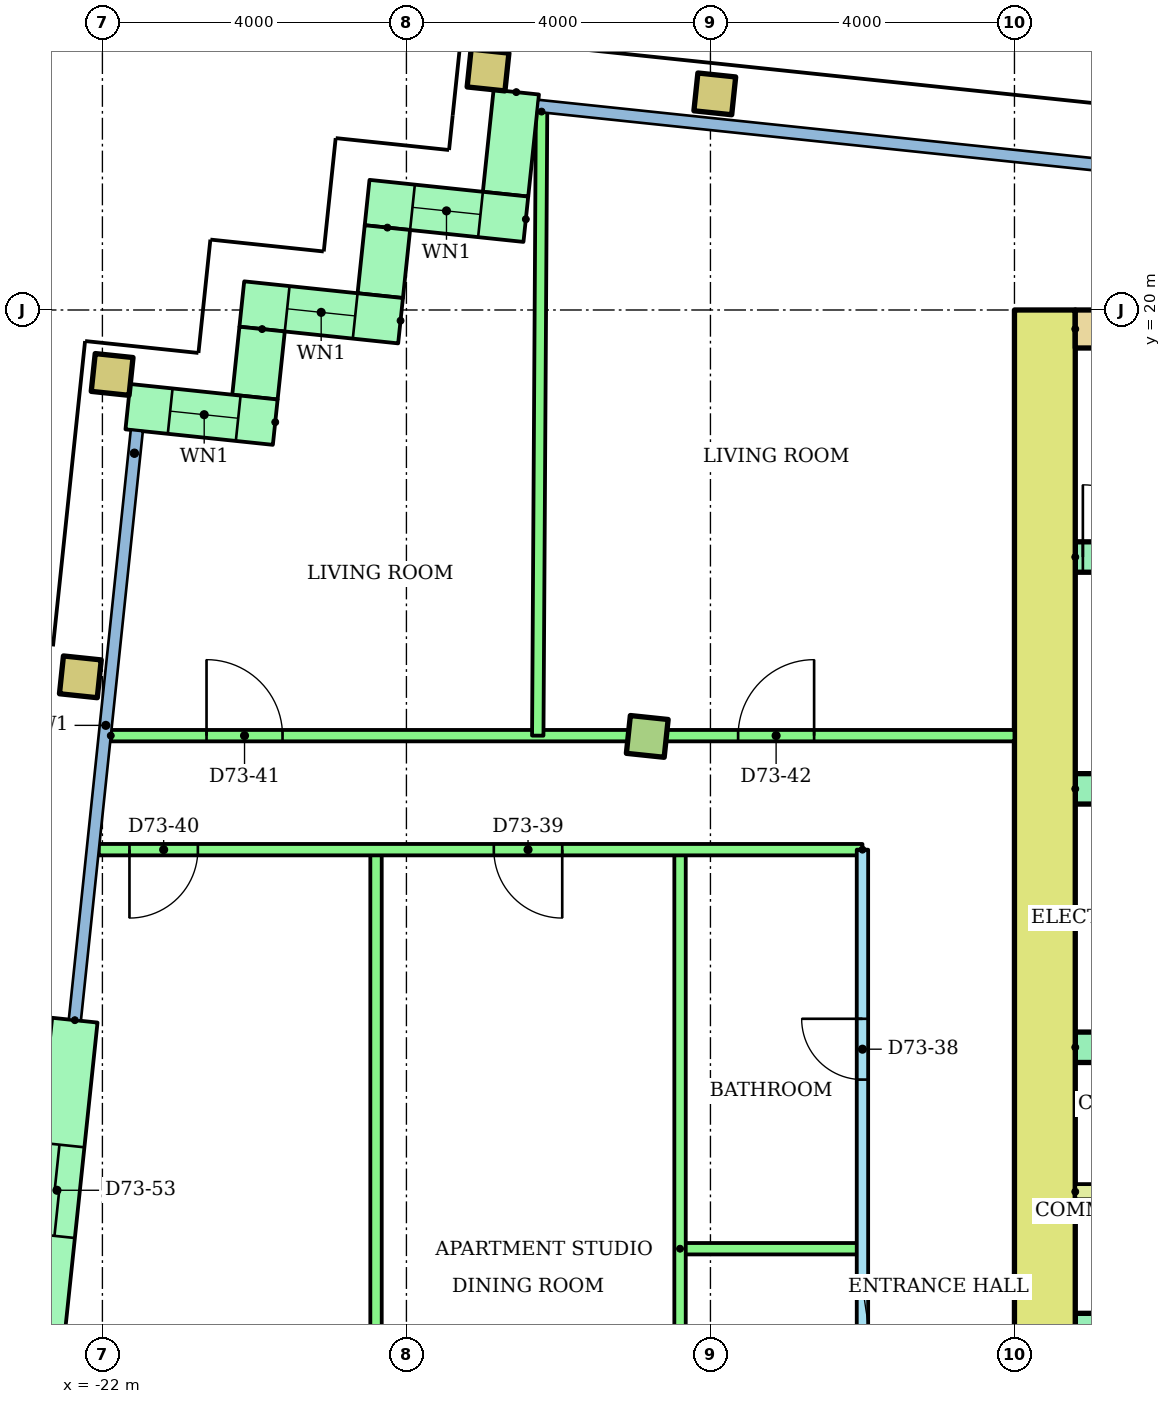
"""IFC4 building model, lengths in metres.
Left out: names, types, materials, properties, quantities, classifications, styles, units other than length and angle.
Written with IfcOpenShell. Run it as: python <this file> out.ifc"""

import sys

from ifc_helpers import new_model, si_unit, direction, frame, frame_2d, origin, origin_2d, place, context, subcontext, project, spatial, rectangle, hollow_rectangle, extrude, element, fill, save


model = new_model("IFC4")
c1 = context("Model", 3, precision=1e-05, world=origin(), true_north=direction((0.0, 1.0)))
c2 = subcontext(c1, "Body", "Model", "MODEL_VIEW")
j1 = project(units=[si_unit("LENGTHUNIT", "METRE"), si_unit("PLANEANGLEUNIT", "RADIAN")], contexts=[c1])
p1 = place(None, origin())
s1 = spatial("IfcSite", under=j1, at=p1, CompositionType="ELEMENT")
p2 = place(p1, origin())
s2 = spatial("IfcBuilding", under=s1, at=p2, CompositionType="ELEMENT")
p3 = place(p2, frame((0.0, 0.0, 278.7)))
s3 = spatial("IfcBuildingStorey", under=s2, at=p3, CompositionType="ELEMENT", Elevation=278.7)
p4 = place(p3, frame((-22.29, 15.174, 0.0), z_axis=(0.0, 0.0, 1.0), x_axis=(0.994521895368, -0.104528463268, 0.0)))
e1 = element("IfcColumn", 1, at=p4, inside=s3, PredefinedType="COLUMN", context=c2, shape_type="SweptSolid", body=[
    extrude(hollow_rectangle(XDim=0.5, YDim=0.5, WallThickness=0.025, at=origin_2d()), origin(), (0.0, 0.0, 1.0), 3.2),
])
p5 = place(p3, frame((-14.831, 14.39, 0.0), z_axis=(0.0, 0.0, 1.0), x_axis=(0.994521895368, -0.104528463268, 0.0)))
e2 = element("IfcColumn", 2, at=p5, inside=s3, PredefinedType="COLUMN", context=c2, shape_type="SweptSolid", body=[
    extrude(rectangle(XDim=0.5, YDim=0.5, at=origin_2d()), origin(), (0.0, 0.0, 1.0), 3.2),
])
for number, where, z_axis, x_axis in (
    (3, (-21.872, 19.152, 0.0), (0.0, 0.0, 1.0), (0.995, -0.105, 0.0)),
    (4, (-16.926, 23.157, 0.0), (0.0, 0.0, 1.0), (0.995, -0.105, 0.0)),
    (5, (-13.943, 22.843, 0.0), (0.0, 0.0, 1.0), (0.995, -0.105, 0.0)),
):
    element("IfcColumn", number, at=place(p3, frame(where, z_axis=z_axis, x_axis=x_axis)), inside=s3, PredefinedType="COLUMN", context=c2, shape_type="SweptSolid", body=[
        extrude(hollow_rectangle(XDim=0.5, YDim=0.5, WallThickness=0.025, at=origin_2d()), origin(), (0.0, 0.0, 1.0), 3.2),
    ])
p6 = place(p3, frame((-16.555, 22.866, 0.0), z_axis=(0.0, 0.0, 1.0), x_axis=(-0.104515354875, -0.994523273029, 0.0)))
e6 = element("IfcWall", 6, at=p6, inside=s3, PredefinedType="STANDARD", context=c2, shape_type="SweptSolid", body=[
    extrude(rectangle(XDim=1.35, YDim=0.6, at=frame_2d((0.675, 0.0))), origin(), (0.0, 0.0, 1.0), 2.8),
])
p7 = place(p3, frame((-16.429, 21.194, 0.0), z_axis=(0.0, 0.0, 1.0), x_axis=(-0.994522640205, 0.104521376379, 0.0)))
e7 = element("IfcWall", 7, at=p7, inside=s3, PredefinedType="STANDARD", context=c2, shape_type="SweptSolid", body=[
    extrude(rectangle(XDim=2.1, YDim=0.6, at=frame_2d((1.05, 0.0))), origin(), (0.0, 0.0, 1.0), 2.8),
])
p8 = place(p7, frame((0.6, 0.0, 0.9)))
e8 = element("IfcOpeningElement", 8, at=p8, cuts=e7, PredefinedType="OPENING", context=c2, shape_type="SweptSolid", body=[
    extrude(rectangle(XDim=0.9, YDim=1.5, at=frame_2d((0.45, 0.75))), frame((0.0, 0.31, 0.0), z_axis=(0.0, -1.0, 0.0), x_axis=(1.0, 0.0, 0.0)), (0.0, 0.0, 1.0), 0.62),
])
p9 = place(p3, frame((-18.25, 21.084, 0.0), z_axis=(0.0, 0.0, 1.0), x_axis=(-0.104416541099, -0.994533652495, 0.0)))
e9 = element("IfcWall", 9, at=p9, inside=s3, PredefinedType="STANDARD", context=c2, shape_type="SweptSolid", body=[
    extrude(rectangle(XDim=0.9, YDim=0.6, at=frame_2d((0.45, 0.0))), origin(), (0.0, 0.0, 1.0), 2.8),
])
p10 = place(p3, frame((-18.077, 19.859, 0.0), z_axis=(0.0, 0.0, 1.0), x_axis=(-0.994522640205, 0.104521376379, 0.0)))
e10 = element("IfcWall", 10, at=p10, inside=s3, PredefinedType="STANDARD", context=c2, shape_type="SweptSolid", body=[
    extrude(rectangle(XDim=2.1, YDim=0.6, at=frame_2d((1.05, 0.0))), origin(), (0.0, 0.0, 1.0), 2.8),
])
p11 = place(p10, frame((0.6, 0.0, 0.9)))
e11 = element("IfcOpeningElement", 11, at=p11, cuts=e10, PredefinedType="OPENING", context=c2, shape_type="SweptSolid", body=[
    extrude(rectangle(XDim=0.9, YDim=1.5, at=frame_2d((0.45, 0.75))), frame((0.0, 0.31, 0.0), z_axis=(0.0, -1.0, 0.0), x_axis=(1.0, 0.0, 0.0)), (0.0, 0.0, 1.0), 0.62),
])
p12 = place(p3, frame((-19.899, 19.749, 0.0), z_axis=(0.0, 0.0, 1.0), x_axis=(-0.104741284723, -0.994499503909, 0.0)))
e12 = element("IfcWall", 12, at=p12, inside=s3, PredefinedType="STANDARD", context=c2, shape_type="SweptSolid", body=[
    extrude(rectangle(XDim=0.9, YDim=0.6, at=frame_2d((0.45, 0.0))), origin(), (0.0, 0.0, 1.0), 2.8),
])
p13 = place(p3, frame((-19.726, 18.524, 0.0), z_axis=(0.0, 0.0, 1.0), x_axis=(-0.994534226826, 0.104411070641, 0.0)))
e13 = element("IfcWall", 13, at=p13, inside=s3, PredefinedType="STANDARD", context=c2, shape_type="SweptSolid", body=[
    extrude(rectangle(XDim=1.95, YDim=0.6, at=frame_2d((0.975, 0.0))), origin(), (0.0, 0.0, 1.0), 2.8),
])
p14 = place(p13, frame((0.49, 0.0, 0.9)))
e14 = element("IfcOpeningElement", 14, at=p14, cuts=e13, PredefinedType="OPENING", context=c2, shape_type="SweptSolid", body=[
    extrude(rectangle(XDim=0.9, YDim=1.5, at=frame_2d((0.45, 0.75))), frame((0.0, 0.31, 0.0), z_axis=(0.0, -1.0, 0.0), x_axis=(1.0, 0.0, 0.0)), (0.0, 0.0, 1.0), 0.62),
])
p15 = place(p3, frame((-22.363, 10.657, 0.0), z_axis=(0.0, 0.0, 1.0), x_axis=(-0.104492739125, -0.994525649478, 0.0)))
e15 = element("IfcWall", 15, at=p15, inside=s3, PredefinedType="STANDARD", context=c2, shape_type="SweptSolid", body=[
    extrude(rectangle(XDim=4.5, YDim=0.6, at=frame_2d((2.25, 0.0))), origin(), (0.0, 0.0, 1.0), 2.8),
])
p16 = place(p15, frame((1.65, 0.0, 0.0)))
e16 = element("IfcOpeningElement", 16, at=p16, cuts=e15, PredefinedType="OPENING", context=c2, shape_type="SweptSolid", body=[
    extrude(rectangle(XDim=1.2, YDim=2.1, at=frame_2d((0.6, 1.05))), frame((0.0, 0.31, 0.0), z_axis=(0.0, -1.0, 0.0), x_axis=(1.0, 0.0, 0.0)), (0.0, 0.0, 1.0), 0.62),
])
p17 = place(p3, frame((-9.6, 6.4, 0.0), z_axis=(0.0, 0.0, 1.0), x_axis=(0.0, 1.0, 0.0)))
e17 = element("IfcWall", 17, at=p17, inside=s3, PredefinedType="SHEAR", context=c2, shape_type="SweptSolid", body=[
    extrude(rectangle(XDim=13.6, YDim=0.8, at=frame_2d((6.8, 0.0))), origin(), (0.0, 0.0, 1.0), 2.8),
])
p18 = place(p3, frame((-9.2, 19.75, 0.0)))
e18 = element("IfcWall", 18, at=p18, inside=s3, PredefinedType="SHEAR", context=c2, shape_type="SweptSolid", body=[
    extrude(rectangle(XDim=18.4, YDim=0.5, at=frame_2d((9.2, 0.0))), origin(), (0.0, 0.0, 1.0), 2.8),
])
p19 = place(p3, frame((-9.2, 6.6, 0.0)))
e19 = element("IfcWall", 19, at=p19, inside=s3, PredefinedType="SHEAR", context=c2, shape_type="SweptSolid", body=[
    extrude(rectangle(XDim=18.4, YDim=0.4, at=frame_2d((9.2, 0.0))), origin(), (0.0, 0.0, 1.0), 2.8),
])
p20 = place(p19, frame((8.3, 0.0, 0.0)))
e20 = element("IfcOpeningElement", 20, at=p20, cuts=e19, PredefinedType="OPENING", context=c2, shape_type="SweptSolid", body=[
    extrude(rectangle(XDim=1.8, YDim=2.1, at=frame_2d((0.9, 1.05))), frame((0.0, 0.21, 0.0), z_axis=(0.0, -1.0, 0.0), x_axis=(1.0, 0.0, 0.0)), (0.0, 0.0, 1.0), 0.42),
])
p21 = place(p19, frame((3.8, 0.0, 0.0)))
e21 = element("IfcOpeningElement", 21, at=p21, cuts=e19, PredefinedType="OPENING", context=c2, shape_type="SweptSolid", body=[
    extrude(rectangle(XDim=1.8, YDim=2.1, at=frame_2d((0.9, 1.05))), frame((0.0, 0.21, 0.0), z_axis=(0.0, -1.0, 0.0), x_axis=(1.0, 0.0, 0.0)), (0.0, 0.0, 1.0), 0.42),
])
p22 = place(p19, frame((12.8, 0.0, 0.0)))
e22 = element("IfcOpeningElement", 22, at=p22, cuts=e19, PredefinedType="OPENING", context=c2, shape_type="SweptSolid", body=[
    extrude(rectangle(XDim=1.8, YDim=2.1, at=frame_2d((0.9, 1.05))), frame((0.0, 0.21, 0.0), z_axis=(0.0, -1.0, 0.0), x_axis=(1.0, 0.0, 0.0)), (0.0, 0.0, 1.0), 0.42),
])
p23 = place(p3, frame((-9.2, 10.3, 0.0)))
e23 = element("IfcWall", 23, at=p23, inside=s3, PredefinedType="SHEAR", context=c2, shape_type="SweptSolid", body=[
    extrude(rectangle(XDim=8.0, YDim=0.4, at=frame_2d((4.0, 0.0))), origin(), (0.0, 0.0, 1.0), 2.8),
])
p24 = place(p23, frame((3.35, 0.0, 0.0)))
e24 = element("IfcOpeningElement", 24, at=p24, cuts=e23, PredefinedType="OPENING", context=c2, shape_type="SweptSolid", body=[
    extrude(rectangle(XDim=1.1, YDim=2.1, at=frame_2d((0.55, 1.05))), frame((0.0, 0.21, 0.0), z_axis=(0.0, -1.0, 0.0), x_axis=(1.0, 0.0, 0.0)), (0.0, 0.0, 1.0), 0.42),
])
p25 = place(p23, frame((6.083, 0.0, 0.0)))
e25 = element("IfcOpeningElement", 25, at=p25, cuts=e23, PredefinedType="OPENING", context=c2, shape_type="SweptSolid", body=[
    extrude(rectangle(XDim=1.1, YDim=2.1, at=frame_2d((0.55, 1.05))), frame((0.0, 0.21, 0.0), z_axis=(0.0, -1.0, 0.0), x_axis=(1.0, 0.0, 0.0)), (0.0, 0.0, 1.0), 0.42),
])
p26 = place(p23, frame((0.917, 0.0, 0.0)))
e26 = element("IfcOpeningElement", 26, at=p26, cuts=e23, PredefinedType="OPENING", context=c2, shape_type="SweptSolid", body=[
    extrude(rectangle(XDim=1.0, YDim=2.1, at=frame_2d((0.5, 1.05))), frame((0.0, 0.21, 0.0), z_axis=(0.0, -1.0, 0.0), x_axis=(1.0, 0.0, 0.0)), (0.0, 0.0, 1.0), 0.42),
])
p27 = place(p3, frame((-9.2, 13.7, 0.0)))
e27 = element("IfcWall", 27, at=p27, inside=s3, PredefinedType="SHEAR", context=c2, shape_type="SweptSolid", body=[
    extrude(rectangle(XDim=8.0, YDim=0.4, at=frame_2d((4.0, 0.0))), origin(), (0.0, 0.0, 1.0), 2.8),
])
p28 = place(p3, frame((-9.2, 16.75, 0.0)))
e28 = element("IfcWall", 28, at=p28, inside=s3, PredefinedType="SHEAR", context=c2, shape_type="SweptSolid", body=[
    extrude(rectangle(XDim=18.4, YDim=0.4, at=frame_2d((9.2, 0.0))), origin(), (0.0, 0.0, 1.0), 2.8),
])
p29 = place(p28, frame((0.1, 0.0, 0.0)))
e29 = element("IfcOpeningElement", 29, at=p29, cuts=e28, PredefinedType="OPENING", context=c2, shape_type="SweptSolid", body=[
    extrude(rectangle(XDim=0.95, YDim=2.1, at=frame_2d((0.475, 1.05))), frame((0.0, 0.21, 0.0), z_axis=(0.0, -1.0, 0.0), x_axis=(1.0, 0.0, 0.0)), (0.0, 0.0, 1.0), 0.42),
])
p30 = place(p28, frame((6.1, 0.0, 0.0)))
e30 = element("IfcOpeningElement", 30, at=p30, cuts=e28, PredefinedType="OPENING", context=c2, shape_type="SweptSolid", body=[
    extrude(rectangle(XDim=0.95, YDim=2.1, at=frame_2d((0.475, 1.05))), frame((0.0, 0.21, 0.0), z_axis=(0.0, -1.0, 0.0), x_axis=(1.0, 0.0, 0.0)), (0.0, 0.0, 1.0), 0.42),
])
p31 = place(p28, frame((12.1, 0.0, 0.0)))
e31 = element("IfcOpeningElement", 31, at=p31, cuts=e28, PredefinedType="OPENING", context=c2, shape_type="SweptSolid", body=[
    extrude(rectangle(XDim=0.95, YDim=2.1, at=frame_2d((0.475, 1.05))), frame((0.0, 0.21, 0.0), z_axis=(0.0, -1.0, 0.0), x_axis=(1.0, 0.0, 0.0)), (0.0, 0.0, 1.0), 0.42),
])
p32 = place(p3, frame((-9.2, 8.4, 0.0)))
e32 = element("IfcWall", 32, at=p32, inside=s3, PredefinedType="PARTITIONING", context=c2, shape_type="SweptSolid", body=[
    extrude(rectangle(XDim=3.4, YDim=0.2, at=frame_2d((1.7, 0.0))), origin(), (0.0, 0.0, 1.0), 2.8),
])
p33 = place(p3, frame((-12.0, 1.4, 0.0), z_axis=(0.0, 0.0, 1.0), x_axis=(0.0, 1.0, 0.0)))
e33 = element("IfcWall", 33, at=p33, inside=s3, PredefinedType="PARTITIONING", context=c2, shape_type="SweptSolid", body=[
    extrude(rectangle(XDim=11.5, YDim=0.15, at=frame_2d((5.75, 0.0))), origin(), (0.0, 0.0, 1.0), 2.4),
])
p34 = place(p33, frame((2.675, 0.0, 0.0)))
e34 = element("IfcOpeningElement", 34, at=p34, cuts=e33, PredefinedType="OPENING", context=c2, shape_type="SweptSolid", body=[
    extrude(rectangle(XDim=0.9, YDim=2.1, at=frame_2d((0.45, 1.05))), frame((0.0, 0.085, 0.0), z_axis=(0.0, -1.0, 0.0), x_axis=(1.0, 0.0, 0.0)), (0.0, 0.0, 1.0), 0.17),
])
p35 = place(p33, frame((8.475, 0.0, 0.0)))
e35 = element("IfcOpeningElement", 35, at=p35, cuts=e33, PredefinedType="OPENING", context=c2, shape_type="SweptSolid", body=[
    extrude(rectangle(XDim=0.8, YDim=2.1, at=frame_2d((0.4, 1.05))), frame((0.0, 0.085, 0.0), z_axis=(0.0, -1.0, 0.0), x_axis=(1.0, 0.0, 0.0)), (0.0, 0.0, 1.0), 0.17),
])
p36 = place(p3, frame((-14.4, 7.65, 0.0)))
e36 = element("IfcWall", 36, at=p36, inside=s3, PredefinedType="PARTITIONING", context=c2, shape_type="SweptSolid", body=[
    extrude(rectangle(XDim=2.4, YDim=0.15, at=frame_2d((1.2, 0.0))), origin(), (0.0, 0.0, 1.0), 2.4),
])
for number, where, z_axis, x_axis in (
    (37, (-14.4, 1.4, 0.0), (0.0, 0.0, 1.0), (0.0, 1.0, 0.0)),
    (38, (-18.4, 1.4, 0.0), (0.0, 0.0, 1.0), (0.0, 1.0, 0.0)),
):
    element("IfcWall", number, at=place(p3, frame(where, z_axis=z_axis, x_axis=x_axis)), inside=s3, PredefinedType="PARTITIONING", context=c2, shape_type="SweptSolid", body=[
        extrude(rectangle(XDim=11.5, YDim=0.15, at=frame_2d((5.75, 0.0))), origin(), (0.0, 0.0, 1.0), 2.4),
    ])
p37 = place(p3, frame((-12.0, 12.9, 0.0), z_axis=(0.0, 0.0, 1.0), x_axis=(-1.0, 0.0, 0.0)))
e39 = element("IfcWall", 39, at=p37, inside=s3, PredefinedType="PARTITIONING", context=c2, shape_type="SweptSolid", body=[
    extrude(rectangle(XDim=10.047, YDim=0.15, at=frame_2d((5.024, 0.0))), origin(), (0.0, 0.0, 1.0), 2.4),
])
p38 = place(p37, frame((3.95, 0.0, 0.0)))
e40 = element("IfcOpeningElement", 40, at=p38, cuts=e39, PredefinedType="OPENING", context=c2, shape_type="SweptSolid", body=[
    extrude(rectangle(XDim=0.9, YDim=2.1, at=frame_2d((0.45, 1.05))), frame((0.0, 0.085, 0.0), z_axis=(0.0, -1.0, 0.0), x_axis=(1.0, 0.0, 0.0)), (0.0, 0.0, 1.0), 0.17),
])
p39 = place(p37, frame((8.744, 0.0, 0.0)))
e41 = element("IfcOpeningElement", 41, at=p39, cuts=e39, PredefinedType="OPENING", context=c2, shape_type="SweptSolid", body=[
    extrude(rectangle(XDim=0.9, YDim=2.1, at=frame_2d((0.45, 1.05))), frame((0.0, 0.085, 0.0), z_axis=(0.0, -1.0, 0.0), x_axis=(1.0, 0.0, 0.0)), (0.0, 0.0, 1.0), 0.17),
])
p40 = place(p3, frame((-21.89, 14.4, 0.0)))
e42 = element("IfcWall", 42, at=p40, inside=s3, PredefinedType="PARTITIONING", context=c2, shape_type="SweptSolid", body=[
    extrude(rectangle(XDim=11.89, YDim=0.15, at=frame_2d((5.945, 0.0))), origin(), (0.0, 0.0, 1.0), 2.4),
])
p41 = place(p40, frame((1.26, 0.0, 0.0)))
e43 = element("IfcOpeningElement", 43, at=p41, cuts=e42, PredefinedType="OPENING", context=c2, shape_type="SweptSolid", body=[
    extrude(rectangle(XDim=1.0, YDim=2.1, at=frame_2d((0.5, 1.05))), frame((0.0, 0.085, 0.0), z_axis=(0.0, -1.0, 0.0), x_axis=(1.0, 0.0, 0.0)), (0.0, 0.0, 1.0), 0.17),
])
p42 = place(p40, frame((8.254, 0.0, 0.0)))
e44 = element("IfcOpeningElement", 44, at=p42, cuts=e42, PredefinedType="OPENING", context=c2, shape_type="SweptSolid", body=[
    extrude(rectangle(XDim=1.0, YDim=2.1, at=frame_2d((0.5, 1.05))), frame((0.0, 0.085, 0.0), z_axis=(0.0, -1.0, 0.0), x_axis=(1.0, 0.0, 0.0)), (0.0, 0.0, 1.0), 0.17),
])
p43 = place(p3, frame((-16.222, 22.61, 0.0), z_axis=(0.0, 0.0, 1.0), x_axis=(-0.006095634594, -0.999981421447, 0.0)))
e45 = element("IfcWall", 45, at=p43, inside=s3, PredefinedType="PARTITIONING", context=c2, shape_type="SweptSolid", body=[
    extrude(rectangle(XDim=8.211, YDim=0.15, at=frame_2d((4.105, 0.0))), origin(), (0.0, 0.0, 1.0), 2.4),
])
p44 = place(p8, origin())
e46 = element("IfcWindow", 46, at=p44, inside=s3, PartitioningType="SINGLE_PANEL", PredefinedType="WINDOW", context=c2, shape_type="SweptSolid", body=[
    extrude(rectangle(XDim=0.9, YDim=1.5, at=frame_2d((0.45, 0.75))), frame((0.0, 0.03, 0.0), z_axis=(0.0, -1.0, 0.0), x_axis=(1.0, 0.0, 0.0)), (0.0, 0.0, 1.0), 0.06),
])
fill(e8, e46)
p45 = place(p11, origin())
e47 = element("IfcWindow", 47, at=p45, inside=s3, PartitioningType="SINGLE_PANEL", PredefinedType="WINDOW", context=c2, shape_type="SweptSolid", body=[
    extrude(rectangle(XDim=0.9, YDim=1.5, at=frame_2d((0.45, 0.75))), frame((0.0, 0.03, 0.0), z_axis=(0.0, -1.0, 0.0), x_axis=(1.0, 0.0, 0.0)), (0.0, 0.0, 1.0), 0.06),
])
fill(e11, e47)
p46 = place(p14, origin())
e48 = element("IfcWindow", 48, at=p46, inside=s3, PartitioningType="SINGLE_PANEL", PredefinedType="WINDOW", context=c2, shape_type="SweptSolid", body=[
    extrude(rectangle(XDim=0.9, YDim=1.5, at=frame_2d((0.45, 0.75))), frame((0.0, 0.03, 0.0), z_axis=(0.0, -1.0, 0.0), x_axis=(1.0, 0.0, 0.0)), (0.0, 0.0, 1.0), 0.06),
])
fill(e14, e48)
p47 = place(p29, origin())
e49 = element("IfcDoor", 49, at=p47, inside=s3, OperationType="SINGLE_SWING_LEFT", PredefinedType="DOOR", context=c2, shape_type="SweptSolid", body=[
    extrude(rectangle(XDim=0.95, YDim=2.1, at=frame_2d((0.475, 1.05))), frame((0.0, 0.025, 0.0), z_axis=(0.0, -1.0, 0.0), x_axis=(1.0, 0.0, 0.0)), (0.0, 0.0, 1.0), 0.05),
])
fill(e29, e49)
p48 = place(p35, origin())
e50 = element("IfcDoor", 50, at=p48, inside=s3, OperationType="SINGLE_SWING_RIGHT", PredefinedType="DOOR", context=c2, shape_type="SweptSolid", body=[
    extrude(rectangle(XDim=0.8, YDim=2.1, at=frame_2d((0.4, 1.05))), frame((0.0, 0.025, 0.0), z_axis=(0.0, -1.0, 0.0), x_axis=(1.0, 0.0, 0.0)), (0.0, 0.0, 1.0), 0.05),
])
fill(e35, e50)
p49 = place(p38, origin())
e51 = element("IfcDoor", 51, at=p49, inside=s3, OperationType="SINGLE_SWING_LEFT", PredefinedType="DOOR", context=c2, shape_type="SweptSolid", body=[
    extrude(rectangle(XDim=0.9, YDim=2.1, at=frame_2d((0.45, 1.05))), frame((0.0, 0.025, 0.0), z_axis=(0.0, -1.0, 0.0), x_axis=(1.0, 0.0, 0.0)), (0.0, 0.0, 1.0), 0.05),
])
fill(e40, e51)
p50 = place(p39, origin())
e52 = element("IfcDoor", 52, at=p50, inside=s3, OperationType="SINGLE_SWING_RIGHT", PredefinedType="DOOR", context=c2, shape_type="SweptSolid", body=[
    extrude(rectangle(XDim=0.9, YDim=2.1, at=frame_2d((0.45, 1.05))), frame((0.0, 0.025, 0.0), z_axis=(0.0, -1.0, 0.0), x_axis=(1.0, 0.0, 0.0)), (0.0, 0.0, 1.0), 0.05),
])
fill(e41, e52)
p51 = place(p41, origin())
e53 = element("IfcDoor", 53, at=p51, inside=s3, OperationType="SINGLE_SWING_LEFT", PredefinedType="DOOR", context=c2, shape_type="SweptSolid", body=[
    extrude(rectangle(XDim=1.0, YDim=2.1, at=frame_2d((0.5, 1.05))), frame((0.0, 0.025, 0.0), z_axis=(0.0, -1.0, 0.0), x_axis=(1.0, 0.0, 0.0)), (0.0, 0.0, 1.0), 0.05),
])
fill(e43, e53)
p52 = place(p42, origin())
e54 = element("IfcDoor", 54, at=p52, inside=s3, OperationType="SINGLE_SWING_RIGHT", PredefinedType="DOOR", context=c2, shape_type="SweptSolid", body=[
    extrude(rectangle(XDim=1.0, YDim=2.1, at=frame_2d((0.5, 1.05))), frame((0.0, 0.025, 0.0), z_axis=(0.0, -1.0, 0.0), x_axis=(1.0, 0.0, 0.0)), (0.0, 0.0, 1.0), 0.05),
])
fill(e44, e54)
p53 = place(p16, origin())
e55 = element("IfcDoor", 55, at=p53, inside=s3, OperationType="SLIDING_TO_LEFT", PredefinedType="DOOR", context=c2, shape_type="SweptSolid", body=[
    extrude(rectangle(XDim=1.2, YDim=2.1, at=frame_2d((0.6, 1.05))), frame((0.0, 0.025, 0.0), z_axis=(0.0, -1.0, 0.0), x_axis=(1.0, 0.0, 0.0)), (0.0, 0.0, 1.0), 0.05),
])
fill(e16, e55)
save(model, sys.argv[1])
